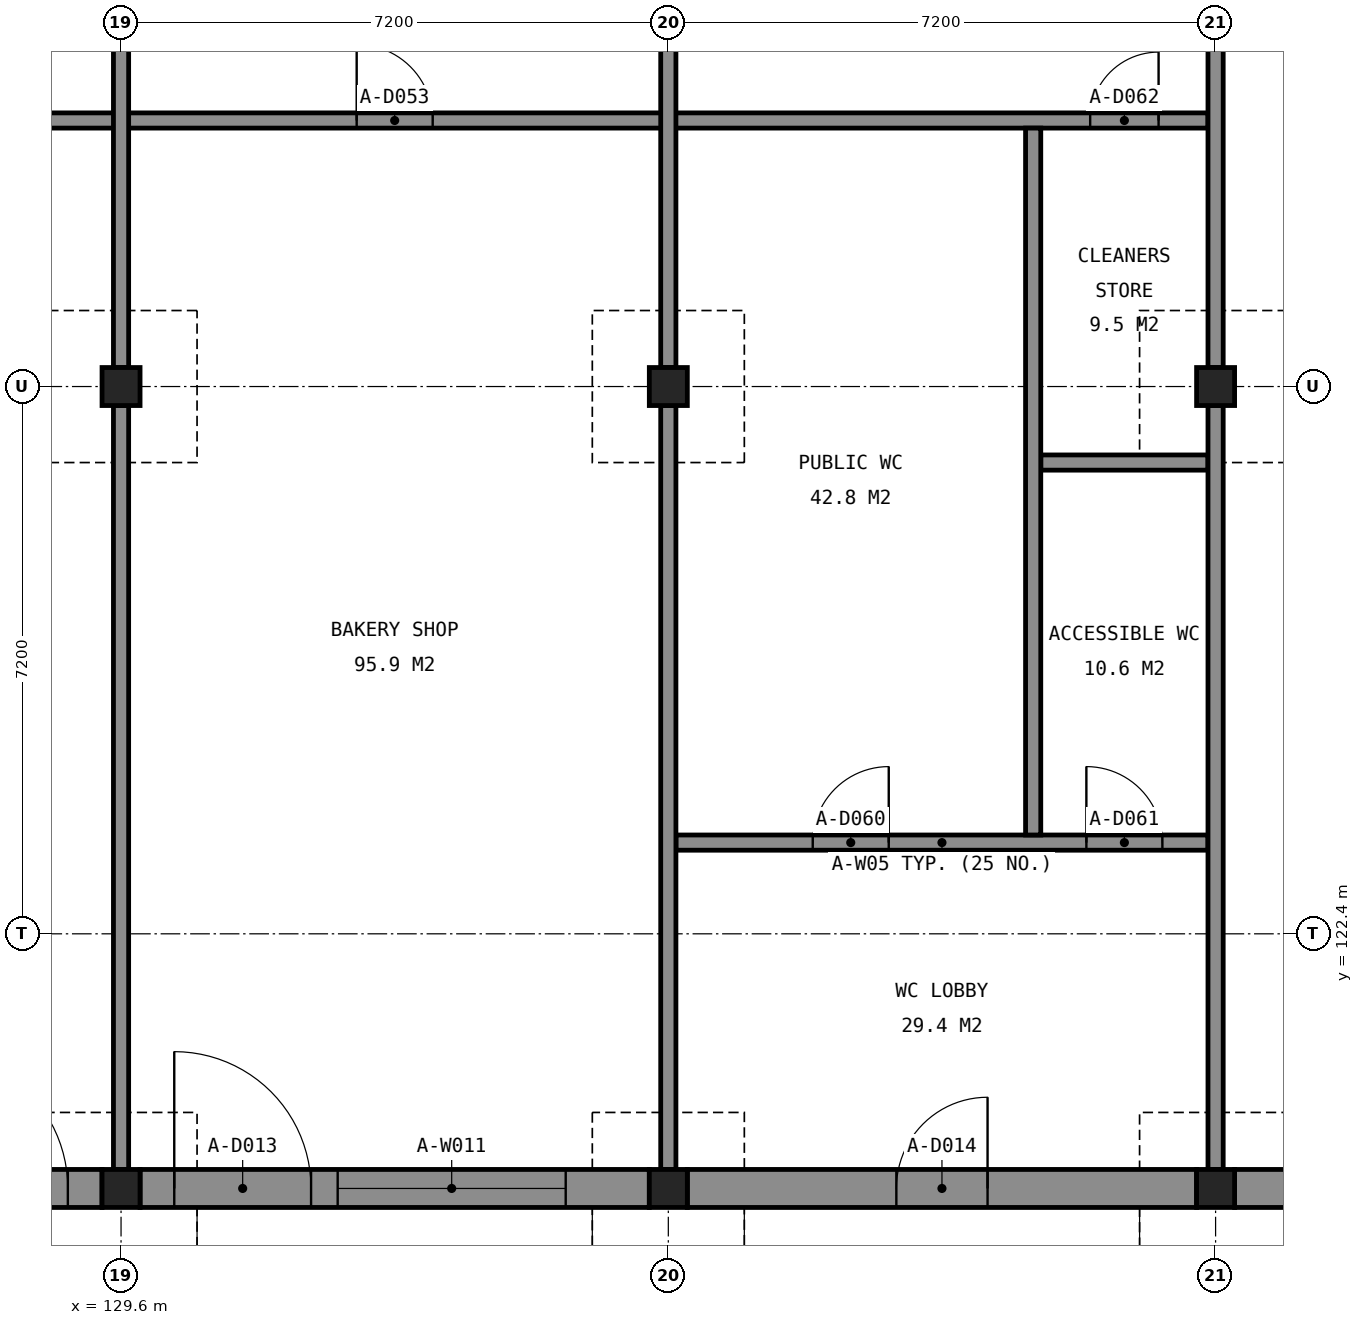
"""IFC4 building model, lengths in metres.
Left out: names, types, materials, properties, quantities, classifications, styles, units other than length and angle.
Written with IfcOpenShell. Run it as: python <this file> out.ifc"""

import sys

from ifc_helpers import new_model, si_unit, direction, frame, frame_2d, origin, origin_2d, place, context, subcontext, project, spatial, rectangle, extrude, element, fill, save


model = new_model("IFC4")
c1 = context("Model", 3, precision=1e-05, world=origin(), true_north=direction((0.0, 1.0)))
c2 = subcontext(c1, "Body", "Model", "MODEL_VIEW")
j1 = project(units=[si_unit("LENGTHUNIT", "METRE"), si_unit("PLANEANGLEUNIT", "RADIAN")], contexts=[c1])
p1 = place(None, origin())
s1 = spatial("IfcSite", under=j1, at=p1, CompositionType="ELEMENT")
p2 = place(p1, origin())
s2 = spatial("IfcBuilding", under=s1, at=p2, CompositionType="ELEMENT")
p3 = place(p2, origin())
s3 = spatial("IfcBuildingStorey", under=s2, at=p3, CompositionType="ELEMENT", Elevation=0.0)
for number, where, z_axis, x_axis in (
    (1, (129.6, 119.05, 0.0), (0.0, 0.0, 1.0), (1.0, 0.0, 0.0)),
    (2, (136.8, 119.05, 0.0), (0.0, 0.0, 1.0), (1.0, 0.0, 0.0)),
    (3, (144.0, 119.05, 0.0), (0.0, 0.0, 1.0), (1.0, 0.0, 0.0)),
    (4, (129.6, 129.6, 0.0), (0.0, 0.0, 1.0), (1.0, 0.0, 0.0)),
    (5, (136.8, 129.6, 0.0), (0.0, 0.0, 1.0), (1.0, 0.0, 0.0)),
    (6, (144.0, 129.6, 0.0), (0.0, 0.0, 1.0), (1.0, 0.0, 0.0)),
):
    element("IfcColumn", number, at=place(p3, frame(where, z_axis=z_axis, x_axis=x_axis)), inside=s3, PredefinedType="COLUMN", context=c2, shape_type="SweptSolid", body=[
        extrude(rectangle(XDim=0.5, YDim=0.5, at=origin_2d()), origin(), (0.0, 0.0, 1.0), 3.7),
    ])
p4 = place(p3, frame((122.65, 119.05, 0.0), z_axis=(0.0, 0.0, 1.0), x_axis=(1.0, 0.0, 0.0)))
e7 = element("IfcWall", 7, at=p4, inside=s3, PredefinedType="SOLIDWALL", context=c2, shape_type="SweptSolid", body=[
    extrude(rectangle(XDim=6.7, YDim=0.5, at=frame_2d((3.35, 0.0))), origin(), (0.0, 0.0, 1.0), 3.6),
])
p5 = place(p4, frame((4.45, 0.0, 0.0)))
e8 = element("IfcOpeningElement", 8, at=p5, cuts=e7, PredefinedType="OPENING", context=c2, shape_type="SweptSolid", body=[
    extrude(rectangle(XDim=1.8, YDim=2.4, at=frame_2d((0.9, 1.2))), frame((0.0, 0.26, 0.0), z_axis=(0.0, -1.0, 0.0), x_axis=(1.0, 0.0, 0.0)), (0.0, 0.0, 1.0), 0.52),
])
p6 = place(p4, frame((0.45, 0.0, 0.6)))
e9 = element("IfcOpeningElement", 9, at=p6, cuts=e7, PredefinedType="OPENING", context=c2, shape_type="SweptSolid", body=[
    extrude(rectangle(XDim=3.0, YDim=2.4, at=frame_2d((1.5, 1.2))), frame((0.0, 0.26, 0.0), z_axis=(0.0, -1.0, 0.0), x_axis=(1.0, 0.0, 0.0)), (0.0, 0.0, 1.0), 0.52),
])
p7 = place(p3, frame((129.85, 119.05, 0.0), z_axis=(0.0, 0.0, 1.0), x_axis=(1.0, 0.0, 0.0)))
e10 = element("IfcWall", 10, at=p7, inside=s3, PredefinedType="SOLIDWALL", context=c2, shape_type="SweptSolid", body=[
    extrude(rectangle(XDim=6.7, YDim=0.5, at=frame_2d((3.35, 0.0))), origin(), (0.0, 0.0, 1.0), 3.6),
])
p8 = place(p7, frame((0.45, 0.0, 0.0)))
e11 = element("IfcOpeningElement", 11, at=p8, cuts=e10, PredefinedType="OPENING", context=c2, shape_type="SweptSolid", body=[
    extrude(rectangle(XDim=1.8, YDim=2.4, at=frame_2d((0.9, 1.2))), frame((0.0, 0.26, 0.0), z_axis=(0.0, -1.0, 0.0), x_axis=(1.0, 0.0, 0.0)), (0.0, 0.0, 1.0), 0.52),
])
p9 = place(p7, frame((2.6, 0.0, 0.6)))
e12 = element("IfcOpeningElement", 12, at=p9, cuts=e10, PredefinedType="OPENING", context=c2, shape_type="SweptSolid", body=[
    extrude(rectangle(XDim=3.0, YDim=2.4, at=frame_2d((1.5, 1.2))), frame((0.0, 0.26, 0.0), z_axis=(0.0, -1.0, 0.0), x_axis=(1.0, 0.0, 0.0)), (0.0, 0.0, 1.0), 0.52),
])
p10 = place(p3, frame((137.05, 119.05, 0.0), z_axis=(0.0, 0.0, 1.0), x_axis=(1.0, 0.0, 0.0)))
e13 = element("IfcWall", 13, at=p10, inside=s3, PredefinedType="SOLIDWALL", context=c2, shape_type="SweptSolid", body=[
    extrude(rectangle(XDim=6.7, YDim=0.5, at=frame_2d((3.35, 0.0))), origin(), (0.0, 0.0, 1.0), 3.6),
])
p11 = place(p10, frame((2.75, 0.0, 0.0)))
e14 = element("IfcOpeningElement", 14, at=p11, cuts=e13, PredefinedType="OPENING", context=c2, shape_type="SweptSolid", body=[
    extrude(rectangle(XDim=1.2, YDim=2.1, at=frame_2d((0.6, 1.05))), frame((0.0, 0.26, 0.0), z_axis=(0.0, -1.0, 0.0), x_axis=(1.0, 0.0, 0.0)), (0.0, 0.0, 1.0), 0.52),
])
p12 = place(p3, frame((144.25, 119.05, 0.0), z_axis=(0.0, 0.0, 1.0), x_axis=(1.0, 0.0, 0.0)))
e15 = element("IfcWall", 15, at=p12, inside=s3, PredefinedType="SOLIDWALL", context=c2, shape_type="SweptSolid", body=[
    extrude(rectangle(XDim=6.45, YDim=0.5, at=frame_2d((3.225, 0.0))), origin(), (0.0, 0.0, 1.0), 3.6),
])
p13 = place(p12, frame((5.65, 0.0, 0.0), z_axis=(0.0, 0.0, 1.0), x_axis=(-1.0, 0.0, 0.0)))
e16 = element("IfcOpeningElement", 16, at=p13, cuts=e15, PredefinedType="OPENING", context=c2, shape_type="SweptSolid", body=[
    extrude(rectangle(XDim=1.2, YDim=2.1, at=frame_2d((0.6, 1.05))), frame((0.0, 0.26, 0.0), z_axis=(0.0, -1.0, 0.0), x_axis=(1.0, 0.0, 0.0)), (0.0, 0.0, 1.0), 0.52),
])
p14 = place(p3, frame((136.9, 123.6, 0.0), z_axis=(0.0, 0.0, 1.0), x_axis=(1.0, 0.0, 0.0)))
e17 = element("IfcWall", 17, at=p14, inside=s3, PredefinedType="PARTITIONING", context=c2, shape_type="SweptSolid", body=[
    extrude(rectangle(XDim=7.0, YDim=0.2, at=frame_2d((3.5, 0.0))), origin(), (0.0, 0.0, 1.0), 3.5),
])
p15 = place(p14, frame((1.8, 0.0, 0.0)))
e18 = element("IfcOpeningElement", 18, at=p15, cuts=e17, PredefinedType="OPENING", context=c2, shape_type="SweptSolid", body=[
    extrude(rectangle(XDim=1.0, YDim=2.1, at=frame_2d((0.5, 1.05))), frame((0.0, 0.11, 0.0), z_axis=(0.0, -1.0, 0.0), x_axis=(1.0, 0.0, 0.0)), (0.0, 0.0, 1.0), 0.22),
])
p16 = place(p14, frame((5.4, 0.0, 0.0)))
e19 = element("IfcOpeningElement", 19, at=p16, cuts=e17, PredefinedType="OPENING", context=c2, shape_type="SweptSolid", body=[
    extrude(rectangle(XDim=1.0, YDim=2.1, at=frame_2d((0.5, 1.05))), frame((0.0, 0.11, 0.0), z_axis=(0.0, -1.0, 0.0), x_axis=(1.0, 0.0, 0.0)), (0.0, 0.0, 1.0), 0.22),
])
p17 = place(p3, frame((141.7, 128.6, 0.0), z_axis=(0.0, 0.0, 1.0), x_axis=(1.0, 0.0, 0.0)))
e20 = element("IfcWall", 20, at=p17, inside=s3, PredefinedType="PARTITIONING", context=c2, shape_type="SweptSolid", body=[
    extrude(rectangle(XDim=2.2, YDim=0.2, at=frame_2d((1.1, 0.0))), origin(), (0.0, 0.0, 1.0), 3.5),
])
p18 = place(p3, frame((57.7, 133.1, 0.0), z_axis=(0.0, 0.0, 1.0), x_axis=(1.0, 0.0, 0.0)))
e21 = element("IfcWall", 21, at=p18, inside=s3, PredefinedType="PARTITIONING", context=c2, shape_type="SweptSolid", body=[
    extrude(rectangle(XDim=86.2, YDim=0.2, at=frame_2d((43.1, 0.0))), origin(), (0.0, 0.0, 1.0), 3.5),
])
p19 = place(p18, frame((3.0, 0.0, 0.0)))
e22 = element("IfcOpeningElement", 22, at=p19, cuts=e21, PredefinedType="OPENING", context=c2, shape_type="SweptSolid", body=[
    extrude(rectangle(XDim=1.0, YDim=2.1, at=frame_2d((0.5, 1.05))), frame((0.0, 0.11, 0.0), z_axis=(0.0, -1.0, 0.0), x_axis=(1.0, 0.0, 0.0)), (0.0, 0.0, 1.0), 0.22),
])
p20 = place(p18, frame((10.2, 0.0, 0.0)))
e23 = element("IfcOpeningElement", 23, at=p20, cuts=e21, PredefinedType="OPENING", context=c2, shape_type="SweptSolid", body=[
    extrude(rectangle(XDim=1.0, YDim=2.1, at=frame_2d((0.5, 1.05))), frame((0.0, 0.11, 0.0), z_axis=(0.0, -1.0, 0.0), x_axis=(1.0, 0.0, 0.0)), (0.0, 0.0, 1.0), 0.22),
])
p21 = place(p18, frame((17.4, 0.0, 0.0)))
e24 = element("IfcOpeningElement", 24, at=p21, cuts=e21, PredefinedType="OPENING", context=c2, shape_type="SweptSolid", body=[
    extrude(rectangle(XDim=1.0, YDim=2.1, at=frame_2d((0.5, 1.05))), frame((0.0, 0.11, 0.0), z_axis=(0.0, -1.0, 0.0), x_axis=(1.0, 0.0, 0.0)), (0.0, 0.0, 1.0), 0.22),
])
p22 = place(p18, frame((24.6, 0.0, 0.0)))
e25 = element("IfcOpeningElement", 25, at=p22, cuts=e21, PredefinedType="OPENING", context=c2, shape_type="SweptSolid", body=[
    extrude(rectangle(XDim=1.0, YDim=2.1, at=frame_2d((0.5, 1.05))), frame((0.0, 0.11, 0.0), z_axis=(0.0, -1.0, 0.0), x_axis=(1.0, 0.0, 0.0)), (0.0, 0.0, 1.0), 0.22),
])
p23 = place(p18, frame((31.8, 0.0, 0.0)))
e26 = element("IfcOpeningElement", 26, at=p23, cuts=e21, PredefinedType="OPENING", context=c2, shape_type="SweptSolid", body=[
    extrude(rectangle(XDim=1.0, YDim=2.1, at=frame_2d((0.5, 1.05))), frame((0.0, 0.11, 0.0), z_axis=(0.0, -1.0, 0.0), x_axis=(1.0, 0.0, 0.0)), (0.0, 0.0, 1.0), 0.22),
])
p24 = place(p18, frame((39.0, 0.0, 0.0)))
e27 = element("IfcOpeningElement", 27, at=p24, cuts=e21, PredefinedType="OPENING", context=c2, shape_type="SweptSolid", body=[
    extrude(rectangle(XDim=1.0, YDim=2.1, at=frame_2d((0.5, 1.05))), frame((0.0, 0.11, 0.0), z_axis=(0.0, -1.0, 0.0), x_axis=(1.0, 0.0, 0.0)), (0.0, 0.0, 1.0), 0.22),
])
p25 = place(p18, frame((46.2, 0.0, 0.0)))
e28 = element("IfcOpeningElement", 28, at=p25, cuts=e21, PredefinedType="OPENING", context=c2, shape_type="SweptSolid", body=[
    extrude(rectangle(XDim=1.0, YDim=2.1, at=frame_2d((0.5, 1.05))), frame((0.0, 0.11, 0.0), z_axis=(0.0, -1.0, 0.0), x_axis=(1.0, 0.0, 0.0)), (0.0, 0.0, 1.0), 0.22),
])
p26 = place(p18, frame((53.4, 0.0, 0.0)))
e29 = element("IfcOpeningElement", 29, at=p26, cuts=e21, PredefinedType="OPENING", context=c2, shape_type="SweptSolid", body=[
    extrude(rectangle(XDim=1.0, YDim=2.1, at=frame_2d((0.5, 1.05))), frame((0.0, 0.11, 0.0), z_axis=(0.0, -1.0, 0.0), x_axis=(1.0, 0.0, 0.0)), (0.0, 0.0, 1.0), 0.22),
])
p27 = place(p18, frame((60.6, 0.0, 0.0)))
e30 = element("IfcOpeningElement", 30, at=p27, cuts=e21, PredefinedType="OPENING", context=c2, shape_type="SweptSolid", body=[
    extrude(rectangle(XDim=1.0, YDim=2.1, at=frame_2d((0.5, 1.05))), frame((0.0, 0.11, 0.0), z_axis=(0.0, -1.0, 0.0), x_axis=(1.0, 0.0, 0.0)), (0.0, 0.0, 1.0), 0.22),
])
p28 = place(p18, frame((67.8, 0.0, 0.0)))
e31 = element("IfcOpeningElement", 31, at=p28, cuts=e21, PredefinedType="OPENING", context=c2, shape_type="SweptSolid", body=[
    extrude(rectangle(XDim=1.0, YDim=2.1, at=frame_2d((0.5, 1.05))), frame((0.0, 0.11, 0.0), z_axis=(0.0, -1.0, 0.0), x_axis=(1.0, 0.0, 0.0)), (0.0, 0.0, 1.0), 0.22),
])
p29 = place(p18, frame((75.0, 0.0, 0.0)))
e32 = element("IfcOpeningElement", 32, at=p29, cuts=e21, PredefinedType="OPENING", context=c2, shape_type="SweptSolid", body=[
    extrude(rectangle(XDim=1.0, YDim=2.1, at=frame_2d((0.5, 1.05))), frame((0.0, 0.11, 0.0), z_axis=(0.0, -1.0, 0.0), x_axis=(1.0, 0.0, 0.0)), (0.0, 0.0, 1.0), 0.22),
])
p30 = place(p18, frame((84.65, 0.0, 0.0)))
e33 = element("IfcOpeningElement", 33, at=p30, cuts=e21, PredefinedType="OPENING", context=c2, shape_type="SweptSolid", body=[
    extrude(rectangle(XDim=0.9, YDim=2.1, at=frame_2d((0.45, 1.05))), frame((0.0, 0.11, 0.0), z_axis=(0.0, -1.0, 0.0), x_axis=(1.0, 0.0, 0.0)), (0.0, 0.0, 1.0), 0.22),
])
p31 = place(p3, frame((129.6, 119.3, 0.0), z_axis=(0.0, 0.0, 1.0), x_axis=(0.0, 1.0, 0.0)))
e34 = element("IfcWall", 34, at=p31, inside=s3, PredefinedType="PARTITIONING", context=c2, shape_type="SweptSolid", body=[
    extrude(rectangle(XDim=10.05, YDim=0.2, at=frame_2d((5.025, 0.0))), origin(), (0.0, 0.0, 1.0), 3.5),
])
p32 = place(p3, frame((129.6, 129.85, 0.0), z_axis=(0.0, 0.0, 1.0), x_axis=(0.0, 1.0, 0.0)))
e35 = element("IfcWall", 35, at=p32, inside=s3, PredefinedType="PARTITIONING", context=c2, shape_type="SweptSolid", body=[
    extrude(rectangle(XDim=7.95, YDim=0.2, at=frame_2d((3.975, 0.0))), origin(), (0.0, 0.0, 1.0), 3.5),
])
p33 = place(p3, frame((136.8, 119.3, 0.0), z_axis=(0.0, 0.0, 1.0), x_axis=(0.0, 1.0, 0.0)))
e36 = element("IfcWall", 36, at=p33, inside=s3, PredefinedType="PARTITIONING", context=c2, shape_type="SweptSolid", body=[
    extrude(rectangle(XDim=10.05, YDim=0.2, at=frame_2d((5.025, 0.0))), origin(), (0.0, 0.0, 1.0), 3.5),
])
p34 = place(p3, frame((136.8, 129.85, 0.0), z_axis=(0.0, 0.0, 1.0), x_axis=(0.0, 1.0, 0.0)))
e37 = element("IfcWall", 37, at=p34, inside=s3, PredefinedType="PARTITIONING", context=c2, shape_type="SweptSolid", body=[
    extrude(rectangle(XDim=7.95, YDim=0.2, at=frame_2d((3.975, 0.0))), origin(), (0.0, 0.0, 1.0), 3.5),
])
p35 = place(p3, frame((141.6, 123.7, 0.0), z_axis=(0.0, 0.0, 1.0), x_axis=(0.0, 1.0, 0.0)))
e38 = element("IfcWall", 38, at=p35, inside=s3, PredefinedType="PARTITIONING", context=c2, shape_type="SweptSolid", body=[
    extrude(rectangle(XDim=9.3, YDim=0.2, at=frame_2d((4.65, 0.0))), origin(), (0.0, 0.0, 1.0), 3.5),
])
p36 = place(p3, frame((144.0, 119.3, 0.0), z_axis=(0.0, 0.0, 1.0), x_axis=(0.0, 1.0, 0.0)))
e39 = element("IfcWall", 39, at=p36, inside=s3, PredefinedType="PARTITIONING", context=c2, shape_type="SweptSolid", body=[
    extrude(rectangle(XDim=10.05, YDim=0.2, at=frame_2d((5.025, 0.0))), origin(), (0.0, 0.0, 1.0), 3.5),
])
p37 = place(p3, frame((144.0, 129.85, 0.0), z_axis=(0.0, 0.0, 1.0), x_axis=(0.0, 1.0, 0.0)))
e40 = element("IfcWall", 40, at=p37, inside=s3, PredefinedType="PARTITIONING", context=c2, shape_type="SweptSolid", body=[
    extrude(rectangle(XDim=7.95, YDim=0.2, at=frame_2d((3.975, 0.0))), origin(), (0.0, 0.0, 1.0), 3.5),
])
p38 = place(p5, origin())
e41 = element("IfcDoor", 41, at=p38, inside=s3, OperationType="DOUBLE_DOOR_DOUBLE_SWING", PredefinedType="DOOR", context=c2, shape_type="SweptSolid", body=[
    extrude(rectangle(XDim=1.8, YDim=2.4, at=frame_2d((0.9, 1.2))), frame((0.0, 0.025, 0.0), z_axis=(0.0, -1.0, 0.0), x_axis=(1.0, 0.0, 0.0)), (0.0, 0.0, 1.0), 0.05),
])
fill(e8, e41)
p39 = place(p8, origin())
e42 = element("IfcDoor", 42, at=p39, inside=s3, OperationType="DOUBLE_DOOR_DOUBLE_SWING", PredefinedType="DOOR", context=c2, shape_type="SweptSolid", body=[
    extrude(rectangle(XDim=1.8, YDim=2.4, at=frame_2d((0.9, 1.2))), frame((0.0, 0.025, 0.0), z_axis=(0.0, -1.0, 0.0), x_axis=(1.0, 0.0, 0.0)), (0.0, 0.0, 1.0), 0.05),
])
fill(e11, e42)
p40 = place(p9, origin())
e43 = element("IfcWindow", 43, at=p40, inside=s3, PartitioningType="SINGLE_PANEL", PredefinedType="WINDOW", context=c2, shape_type="SweptSolid", body=[
    extrude(rectangle(XDim=3.0, YDim=2.4, at=frame_2d((1.5, 1.2))), frame((0.0, 0.03, 0.0), z_axis=(0.0, -1.0, 0.0), x_axis=(1.0, 0.0, 0.0)), (0.0, 0.0, 1.0), 0.06),
])
fill(e12, e43)
p41 = place(p11, origin())
e44 = element("IfcDoor", 44, at=p41, inside=s3, OperationType="SINGLE_SWING_RIGHT", PredefinedType="DOOR", context=c2, shape_type="SweptSolid", body=[
    extrude(rectangle(XDim=1.2, YDim=2.1, at=frame_2d((0.6, 1.05))), frame((0.0, 0.025, 0.0), z_axis=(0.0, -1.0, 0.0), x_axis=(1.0, 0.0, 0.0)), (0.0, 0.0, 1.0), 0.05),
])
fill(e14, e44)
p42 = place(p29, origin())
e45 = element("IfcDoor", 45, at=p42, inside=s3, OperationType="SINGLE_SWING_LEFT", PredefinedType="DOOR", context=c2, shape_type="SweptSolid", body=[
    extrude(rectangle(XDim=1.0, YDim=2.1, at=frame_2d((0.5, 1.05))), frame((0.0, 0.025, 0.0), z_axis=(0.0, -1.0, 0.0), x_axis=(1.0, 0.0, 0.0)), (0.0, 0.0, 1.0), 0.05),
])
fill(e32, e45)
p43 = place(p15, origin())
e46 = element("IfcDoor", 46, at=p43, inside=s3, OperationType="SINGLE_SWING_RIGHT", PredefinedType="DOOR", context=c2, shape_type="SweptSolid", body=[
    extrude(rectangle(XDim=1.0, YDim=2.1, at=frame_2d((0.5, 1.05))), frame((0.0, 0.025, 0.0), z_axis=(0.0, -1.0, 0.0), x_axis=(1.0, 0.0, 0.0)), (0.0, 0.0, 1.0), 0.05),
])
fill(e18, e46)
p44 = place(p16, origin())
e47 = element("IfcDoor", 47, at=p44, inside=s3, OperationType="SINGLE_SWING_LEFT", PredefinedType="DOOR", context=c2, shape_type="SweptSolid", body=[
    extrude(rectangle(XDim=1.0, YDim=2.1, at=frame_2d((0.5, 1.05))), frame((0.0, 0.025, 0.0), z_axis=(0.0, -1.0, 0.0), x_axis=(1.0, 0.0, 0.0)), (0.0, 0.0, 1.0), 0.05),
])
fill(e19, e47)
p45 = place(p30, origin())
e48 = element("IfcDoor", 48, at=p45, inside=s3, OperationType="SINGLE_SWING_RIGHT", PredefinedType="DOOR", context=c2, shape_type="SweptSolid", body=[
    extrude(rectangle(XDim=0.9, YDim=2.1, at=frame_2d((0.45, 1.05))), frame((0.0, 0.025, 0.0), z_axis=(0.0, -1.0, 0.0), x_axis=(1.0, 0.0, 0.0)), (0.0, 0.0, 1.0), 0.05),
])
fill(e33, e48)
save(model, sys.argv[1])
